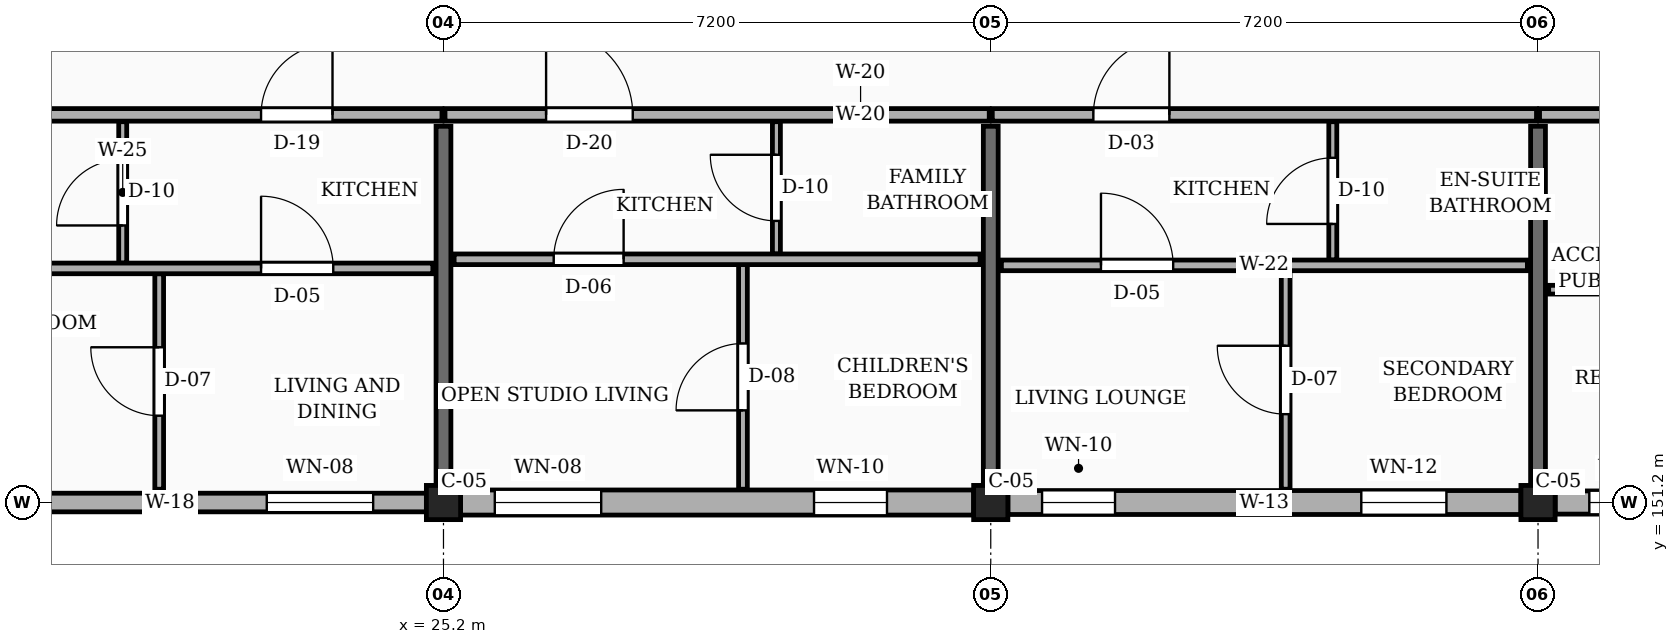
"""IFC4 building model, lengths in metres.
Left out: names, types, materials, properties, quantities, classifications, styles, units other than length and angle.
Written with IfcOpenShell. Run it as: python <this file> out.ifc"""

import sys

from ifc_helpers import new_model, si_unit, direction, frame, frame_2d, origin, origin_2d, place, context, subcontext, project, spatial, rectangle, extrude, element, fill, save


model = new_model("IFC4")
c1 = context("Model", 3, precision=1e-05, world=origin(), true_north=direction((0.0, 1.0)))
c2 = subcontext(c1, "Body", "Model", "MODEL_VIEW")
j1 = project(units=[si_unit("LENGTHUNIT", "METRE"), si_unit("PLANEANGLEUNIT", "RADIAN")], contexts=[c1])
p1 = place(None, origin())
s1 = spatial("IfcSite", under=j1, at=p1, CompositionType="ELEMENT")
p2 = place(p1, origin())
s2 = spatial("IfcBuilding", under=s1, at=p2, CompositionType="ELEMENT")
p3 = place(p2, frame((0.0, 0.0, 42.3)))
s3 = spatial("IfcBuildingStorey", under=s2, at=p3, CompositionType="ELEMENT", Elevation=42.3)
for number, where, z_axis, x_axis in (
    (1, (25.2, 151.2, 0.0), (0.0, 0.0, 1.0), (1.0, 0.0, 0.0)),
    (2, (32.4, 151.2, 0.0), (0.0, 0.0, 1.0), (1.0, 0.0, 0.0)),
    (3, (39.6, 151.2, 0.0), (0.0, 0.0, 1.0), (1.0, 0.0, 0.0)),
):
    element("IfcColumn", number, at=place(p3, frame(where, z_axis=z_axis, x_axis=x_axis)), inside=s3, PredefinedType="COLUMN", context=c2, shape_type="SweptSolid", body=[
        extrude(rectangle(XDim=0.45, YDim=0.45, at=origin_2d()), origin(), (0.0, 0.0, 1.0), 3.15),
    ])
for number, where, z_axis, x_axis in (
    (4, (25.2, 151.425, 0.0), (0.0, 0.0, 1.0), (0.0, 1.0, 0.0)),
    (5, (32.4, 151.425, 0.0), (0.0, 0.0, 1.0), (0.0, 1.0, 0.0)),
    (6, (39.6, 151.425, 0.0), (0.0, 0.0, 1.0), (0.0, 1.0, 0.0)),
):
    element("IfcWall", number, at=place(p3, frame(where, z_axis=z_axis, x_axis=x_axis)), inside=s3, PredefinedType="SOLIDWALL", context=c2, shape_type="SweptSolid", body=[
        extrude(rectangle(XDim=4.725, YDim=0.195, at=frame_2d((2.362, 0.0))), origin(), (0.0, 0.0, 1.0), 2.22),
    ])
p4 = place(p3, frame((18.225, 151.2, 0.0), z_axis=(0.0, 0.0, 1.0), x_axis=(1.0, 0.0, 0.0)))
e7 = element("IfcWall", 7, at=p4, inside=s3, PredefinedType="SOLIDWALL", context=c2, shape_type="SweptSolid", body=[
    extrude(rectangle(XDim=6.75, YDim=0.245, at=frame_2d((3.375, 0.0))), origin(), (0.0, 0.0, 1.0), 2.46),
])
p5 = place(p4, frame((0.45, 0.0, 0.78)))
e8 = element("IfcOpeningElement", 8, at=p5, cuts=e7, PredefinedType="OPENING", context=c2, shape_type="SweptSolid", body=[
    extrude(rectangle(XDim=1.24, YDim=1.15, at=frame_2d((0.62, 0.575))), frame((0.0, 0.133, 0.0), z_axis=(0.0, -1.0, 0.0), x_axis=(1.0, 0.0, 0.0)), (0.0, 0.0, 1.0), 0.265),
])
p6 = place(p4, frame((4.65, 0.0, 0.78)))
e9 = element("IfcOpeningElement", 9, at=p6, cuts=e7, PredefinedType="OPENING", context=c2, shape_type="SweptSolid", body=[
    extrude(rectangle(XDim=1.4, YDim=1.15, at=frame_2d((0.7, 0.575))), frame((0.0, 0.133, 0.0), z_axis=(0.0, -1.0, 0.0), x_axis=(1.0, 0.0, 0.0)), (0.0, 0.0, 1.0), 0.265),
])
p7 = place(p3, frame((25.425, 151.2, 0.0), z_axis=(0.0, 0.0, 1.0), x_axis=(1.0, 0.0, 0.0)))
e10 = element("IfcWall", 10, at=p7, inside=s3, PredefinedType="SOLIDWALL", context=c2, shape_type="SweptSolid", body=[
    extrude(rectangle(XDim=6.75, YDim=0.33, at=frame_2d((3.375, 0.0))), origin(), (0.0, 0.0, 1.0), 2.46),
])
p8 = place(p7, frame((0.45, 0.0, 0.78)))
e11 = element("IfcOpeningElement", 11, at=p8, cuts=e10, PredefinedType="OPENING", context=c2, shape_type="SweptSolid", body=[
    extrude(rectangle(XDim=1.4, YDim=1.15, at=frame_2d((0.7, 0.575))), frame((0.0, 0.175, 0.0), z_axis=(0.0, -1.0, 0.0), x_axis=(1.0, 0.0, 0.0)), (0.0, 0.0, 1.0), 0.35),
])
p9 = place(p7, frame((4.65, 0.0, 0.78)))
e12 = element("IfcOpeningElement", 12, at=p9, cuts=e10, PredefinedType="OPENING", context=c2, shape_type="SweptSolid", body=[
    extrude(rectangle(XDim=0.96, YDim=1.26, at=frame_2d((0.48, 0.63))), frame((0.0, 0.175, 0.0), z_axis=(0.0, -1.0, 0.0), x_axis=(1.0, 0.0, 0.0)), (0.0, 0.0, 1.0), 0.35),
])
p10 = place(p3, frame((32.625, 151.2, 0.0), z_axis=(0.0, 0.0, 1.0), x_axis=(1.0, 0.0, 0.0)))
e13 = element("IfcWall", 13, at=p10, inside=s3, PredefinedType="SOLIDWALL", context=c2, shape_type="SweptSolid", body=[
    extrude(rectangle(XDim=6.75, YDim=0.315, at=frame_2d((3.375, 0.0))), origin(), (0.0, 0.0, 1.0), 2.46),
])
p11 = place(p10, frame((0.45, 0.0, 0.78)))
e14 = element("IfcOpeningElement", 14, at=p11, cuts=e13, PredefinedType="OPENING", context=c2, shape_type="SweptSolid", body=[
    extrude(rectangle(XDim=0.96, YDim=1.26, at=frame_2d((0.48, 0.63))), frame((0.0, 0.167, 0.0), z_axis=(0.0, -1.0, 0.0), x_axis=(1.0, 0.0, 0.0)), (0.0, 0.0, 1.0), 0.335),
])
p12 = place(p10, frame((4.65, 0.0, 0.78)))
e15 = element("IfcOpeningElement", 15, at=p12, cuts=e13, PredefinedType="OPENING", context=c2, shape_type="SweptSolid", body=[
    extrude(rectangle(XDim=1.12, YDim=1.26, at=frame_2d((0.56, 0.63))), frame((0.0, 0.167, 0.0), z_axis=(0.0, -1.0, 0.0), x_axis=(1.0, 0.0, 0.0)), (0.0, 0.0, 1.0), 0.335),
])
p13 = place(p3, frame((39.825, 151.2, 0.0), z_axis=(0.0, 0.0, 1.0), x_axis=(1.0, 0.0, 0.0)))
e16 = element("IfcWall", 16, at=p13, inside=s3, PredefinedType="SOLIDWALL", context=c2, shape_type="SweptSolid", body=[
    extrude(rectangle(XDim=6.75, YDim=0.305, at=frame_2d((3.375, 0.0))), origin(), (0.0, 0.0, 1.0), 2.46),
])
p14 = place(p13, frame((0.45, 0.0, 0.78)))
e17 = element("IfcOpeningElement", 17, at=p14, cuts=e16, PredefinedType="OPENING", context=c2, shape_type="SweptSolid", body=[
    extrude(rectangle(XDim=1.12, YDim=1.26, at=frame_2d((0.56, 0.63))), frame((0.0, 0.163, 0.0), z_axis=(0.0, -1.0, 0.0), x_axis=(1.0, 0.0, 0.0)), (0.0, 0.0, 1.0), 0.325),
])
p15 = place(p13, frame((4.65, 0.0, 0.78)))
e18 = element("IfcOpeningElement", 18, at=p15, cuts=e16, PredefinedType="OPENING", context=c2, shape_type="SweptSolid", body=[
    extrude(rectangle(XDim=1.28, YDim=1.26, at=frame_2d((0.64, 0.63))), frame((0.0, 0.163, 0.0), z_axis=(0.0, -1.0, 0.0), x_axis=(1.0, 0.0, 0.0)), (0.0, 0.0, 1.0), 0.325),
])
p16 = place(p3, frame((18.175, 156.3, 0.0), z_axis=(0.0, 0.0, 1.0), x_axis=(1.0, 0.0, 0.0)))
e19 = element("IfcWall", 19, at=p16, inside=s3, PredefinedType="PARTITIONING", context=c2, shape_type="SweptSolid", body=[
    extrude(rectangle(XDim=7.005, YDim=0.165, at=frame_2d((3.502, 0.0))), origin(), (0.0, 0.0, 1.0), 2.325),
])
p17 = place(p16, frame((4.625, 0.0, 0.0)))
e20 = element("IfcOpeningElement", 20, at=p17, cuts=e19, PredefinedType="OPENING", context=c2, shape_type="SweptSolid", body=[
    extrude(rectangle(XDim=0.94, YDim=2.12, at=frame_2d((0.47, 1.06))), frame((0.0, 0.093, 0.0), z_axis=(0.0, -1.0, 0.0), x_axis=(1.0, 0.0, 0.0)), (0.0, 0.0, 1.0), 0.185),
])
p18 = place(p3, frame((25.22, 156.3, 0.0), z_axis=(0.0, 0.0, 1.0), x_axis=(1.0, 0.0, 0.0)))
e21 = element("IfcWall", 21, at=p18, inside=s3, PredefinedType="PARTITIONING", context=c2, shape_type="SweptSolid", body=[
    extrude(rectangle(XDim=7.16, YDim=0.165, at=frame_2d((3.58, 0.0))), origin(), (0.0, 0.0, 1.0), 2.325),
])
p19 = place(p18, frame((1.33, 0.0, 0.0)))
e22 = element("IfcOpeningElement", 22, at=p19, cuts=e21, PredefinedType="OPENING", context=c2, shape_type="SweptSolid", body=[
    extrude(rectangle(XDim=1.14, YDim=2.18, at=frame_2d((0.57, 1.09))), frame((0.0, 0.093, 0.0), z_axis=(0.0, -1.0, 0.0), x_axis=(1.0, 0.0, 0.0)), (0.0, 0.0, 1.0), 0.185),
])
p20 = place(p3, frame((32.42, 156.3, 0.0), z_axis=(0.0, 0.0, 1.0), x_axis=(1.0, 0.0, 0.0)))
e23 = element("IfcWall", 23, at=p20, inside=s3, PredefinedType="PARTITIONING", context=c2, shape_type="SweptSolid", body=[
    extrude(rectangle(XDim=7.16, YDim=0.165, at=frame_2d((3.58, 0.0))), origin(), (0.0, 0.0, 1.0), 2.325),
])
p21 = place(p20, frame((1.33, 0.0, 0.0)))
e24 = element("IfcOpeningElement", 24, at=p21, cuts=e23, PredefinedType="OPENING", context=c2, shape_type="SweptSolid", body=[
    extrude(rectangle(XDim=1.0, YDim=2.15, at=frame_2d((0.5, 1.075))), frame((0.0, 0.093, 0.0), z_axis=(0.0, -1.0, 0.0), x_axis=(1.0, 0.0, 0.0)), (0.0, 0.0, 1.0), 0.185),
])
p22 = place(p3, frame((39.62, 156.3, 0.0), z_axis=(0.0, 0.0, 1.0), x_axis=(1.0, 0.0, 0.0)))
e25 = element("IfcWall", 25, at=p22, inside=s3, PredefinedType="PARTITIONING", context=c2, shape_type="SweptSolid", body=[
    extrude(rectangle(XDim=7.005, YDim=0.165, at=frame_2d((3.502, 0.0))), origin(), (0.0, 0.0, 1.0), 2.325),
])
p23 = place(p22, frame((4.33, 0.0, 0.0)))
e26 = element("IfcOpeningElement", 26, at=p23, cuts=e25, PredefinedType="OPENING", context=c2, shape_type="SweptSolid", body=[
    extrude(rectangle(XDim=1.1, YDim=2.15, at=frame_2d((0.55, 1.075))), frame((0.0, 0.093, 0.0), z_axis=(0.0, -1.0, 0.0), x_axis=(1.0, 0.0, 0.0)), (0.0, 0.0, 1.0), 0.185),
])
p24 = place(p3, frame((21.46, 151.375, 0.0), z_axis=(0.0, 0.0, 1.0), x_axis=(0.0, 1.0, 0.0)))
e27 = element("IfcWall", 27, at=p24, inside=s3, PredefinedType="PARTITIONING", context=c2, shape_type="SweptSolid", body=[
    extrude(rectangle(XDim=2.835, YDim=0.115, at=frame_2d((1.417, 0.0))), origin(), (0.0, 0.0, 1.0), 2.325),
])
p25 = place(p24, frame((0.968, 0.0, 0.0)))
e28 = element("IfcOpeningElement", 28, at=p25, cuts=e27, PredefinedType="OPENING", context=c2, shape_type="SweptSolid", body=[
    extrude(rectangle(XDim=0.9, YDim=2.1, at=frame_2d((0.45, 1.05))), frame((0.0, 0.067, 0.0), z_axis=(0.0, -1.0, 0.0), x_axis=(1.0, 0.0, 0.0)), (0.0, 0.0, 1.0), 0.135),
])
p26 = place(p3, frame((20.98, 154.35, 0.0), z_axis=(0.0, 0.0, 1.0), x_axis=(0.0, 1.0, 0.0)))
e29 = element("IfcWall", 29, at=p26, inside=s3, PredefinedType="PARTITIONING", context=c2, shape_type="SweptSolid", body=[
    extrude(rectangle(XDim=1.86, YDim=0.105, at=frame_2d((0.93, 0.0))), origin(), (0.0, 0.0, 1.0), 2.325),
])
p27 = place(p26, frame((0.495, 0.0, 0.0)))
e30 = element("IfcOpeningElement", 30, at=p27, cuts=e29, PredefinedType="OPENING", context=c2, shape_type="SweptSolid", body=[
    extrude(rectangle(XDim=0.87, YDim=2.05, at=frame_2d((0.435, 1.025))), frame((0.0, 0.062, 0.0), z_axis=(0.0, -1.0, 0.0), x_axis=(1.0, 0.0, 0.0)), (0.0, 0.0, 1.0), 0.125),
])
p28 = place(p3, frame((18.175, 154.28, 0.0), z_axis=(0.0, 0.0, 1.0), x_axis=(1.0, 0.0, 0.0)))
e31 = element("IfcWall", 31, at=p28, inside=s3, PredefinedType="PARTITIONING", context=c2, shape_type="SweptSolid", body=[
    extrude(rectangle(XDim=6.885, YDim=0.14, at=frame_2d((3.442, 0.0))), origin(), (0.0, 0.0, 1.0), 2.325),
])
p29 = place(p28, frame((4.625, 0.0, 0.0)))
e32 = element("IfcOpeningElement", 32, at=p29, cuts=e31, PredefinedType="OPENING", context=c2, shape_type="SweptSolid", body=[
    extrude(rectangle(XDim=0.95, YDim=2.1, at=frame_2d((0.475, 1.05))), frame((0.0, 0.08, 0.0), z_axis=(0.0, -1.0, 0.0), x_axis=(1.0, 0.0, 0.0)), (0.0, 0.0, 1.0), 0.16),
])
p30 = place(p3, frame((29.14, 151.375, 0.0), z_axis=(0.0, 0.0, 1.0), x_axis=(0.0, 1.0, 0.0)))
e33 = element("IfcWall", 33, at=p30, inside=s3, PredefinedType="PARTITIONING", context=c2, shape_type="SweptSolid", body=[
    extrude(rectangle(XDim=2.955, YDim=0.115, at=frame_2d((1.478, 0.0))), origin(), (0.0, 0.0, 1.0), 2.325),
])
p31 = place(p30, frame((1.038, 0.0, 0.0)))
e34 = element("IfcOpeningElement", 34, at=p31, cuts=e33, PredefinedType="OPENING", context=c2, shape_type="SweptSolid", body=[
    extrude(rectangle(XDim=0.88, YDim=2.08, at=frame_2d((0.44, 1.04))), frame((0.0, 0.067, 0.0), z_axis=(0.0, -1.0, 0.0), x_axis=(1.0, 0.0, 0.0)), (0.0, 0.0, 1.0), 0.135),
])
p32 = place(p3, frame((29.58, 154.47, 0.0), z_axis=(0.0, 0.0, 1.0), x_axis=(0.0, 1.0, 0.0)))
e35 = element("IfcWall", 35, at=p32, inside=s3, PredefinedType="PARTITIONING", context=c2, shape_type="SweptSolid", body=[
    extrude(rectangle(XDim=1.74, YDim=0.105, at=frame_2d((0.87, 0.0))), origin(), (0.0, 0.0, 1.0), 2.325),
])
p33 = place(p32, frame((0.435, 0.0, 0.0)))
e36 = element("IfcOpeningElement", 36, at=p33, cuts=e35, PredefinedType="OPENING", context=c2, shape_type="SweptSolid", body=[
    extrude(rectangle(XDim=0.87, YDim=2.05, at=frame_2d((0.435, 1.025))), frame((0.0, 0.062, 0.0), z_axis=(0.0, -1.0, 0.0), x_axis=(1.0, 0.0, 0.0)), (0.0, 0.0, 1.0), 0.125),
])
p34 = place(p3, frame((25.34, 154.4, 0.0), z_axis=(0.0, 0.0, 1.0), x_axis=(1.0, 0.0, 0.0)))
e37 = element("IfcWall", 37, at=p34, inside=s3, PredefinedType="PARTITIONING", context=c2, shape_type="SweptSolid", body=[
    extrude(rectangle(XDim=6.92, YDim=0.14, at=frame_2d((3.46, 0.0))), origin(), (0.0, 0.0, 1.0), 2.325),
])
p35 = place(p34, frame((1.31, 0.0, 0.0)))
e38 = element("IfcOpeningElement", 38, at=p35, cuts=e37, PredefinedType="OPENING", context=c2, shape_type="SweptSolid", body=[
    extrude(rectangle(XDim=0.92, YDim=2.1, at=frame_2d((0.46, 1.05))), frame((0.0, 0.08, 0.0), z_axis=(0.0, -1.0, 0.0), x_axis=(1.0, 0.0, 0.0)), (0.0, 0.0, 1.0), 0.16),
])
p36 = place(p3, frame((36.28, 151.375, 0.0), z_axis=(0.0, 0.0, 1.0), x_axis=(0.0, 1.0, 0.0)))
e39 = element("IfcWall", 39, at=p36, inside=s3, PredefinedType="PARTITIONING", context=c2, shape_type="SweptSolid", body=[
    extrude(rectangle(XDim=2.875, YDim=0.115, at=frame_2d((1.438, 0.0))), origin(), (0.0, 0.0, 1.0), 2.325),
])
p37 = place(p36, frame((0.988, 0.0, 0.0)))
e40 = element("IfcOpeningElement", 40, at=p37, cuts=e39, PredefinedType="OPENING", context=c2, shape_type="SweptSolid", body=[
    extrude(rectangle(XDim=0.9, YDim=2.1, at=frame_2d((0.45, 1.05))), frame((0.0, 0.067, 0.0), z_axis=(0.0, -1.0, 0.0), x_axis=(1.0, 0.0, 0.0)), (0.0, 0.0, 1.0), 0.135),
])
p38 = place(p3, frame((36.9, 154.39, 0.0), z_axis=(0.0, 0.0, 1.0), x_axis=(0.0, 1.0, 0.0)))
e41 = element("IfcWall", 41, at=p38, inside=s3, PredefinedType="PARTITIONING", context=c2, shape_type="SweptSolid", body=[
    extrude(rectangle(XDim=1.82, YDim=0.105, at=frame_2d((0.91, 0.0))), origin(), (0.0, 0.0, 1.0), 2.325),
])
p39 = place(p38, frame((0.475, 0.0, 0.0)))
e42 = element("IfcOpeningElement", 42, at=p39, cuts=e41, PredefinedType="OPENING", context=c2, shape_type="SweptSolid", body=[
    extrude(rectangle(XDim=0.87, YDim=2.05, at=frame_2d((0.435, 1.025))), frame((0.0, 0.062, 0.0), z_axis=(0.0, -1.0, 0.0), x_axis=(1.0, 0.0, 0.0)), (0.0, 0.0, 1.0), 0.125),
])
p40 = place(p3, frame((32.54, 154.32, 0.0), z_axis=(0.0, 0.0, 1.0), x_axis=(1.0, 0.0, 0.0)))
e43 = element("IfcWall", 43, at=p40, inside=s3, PredefinedType="PARTITIONING", context=c2, shape_type="SweptSolid", body=[
    extrude(rectangle(XDim=6.92, YDim=0.14, at=frame_2d((3.46, 0.0))), origin(), (0.0, 0.0, 1.0), 2.325),
])
p41 = place(p40, frame((1.31, 0.0, 0.0)))
e44 = element("IfcOpeningElement", 44, at=p41, cuts=e43, PredefinedType="OPENING", context=c2, shape_type="SweptSolid", body=[
    extrude(rectangle(XDim=0.95, YDim=2.1, at=frame_2d((0.475, 1.05))), frame((0.0, 0.08, 0.0), z_axis=(0.0, -1.0, 0.0), x_axis=(1.0, 0.0, 0.0)), (0.0, 0.0, 1.0), 0.16),
])
p42 = place(p3, frame((39.74, 154.0, 0.0), z_axis=(0.0, 0.0, 1.0), x_axis=(1.0, 0.0, 0.0)))
e45 = element("IfcWall", 45, at=p42, inside=s3, PredefinedType="PARTITIONING", context=c2, shape_type="SweptSolid", body=[
    extrude(rectangle(XDim=2.41, YDim=0.115, at=frame_2d((1.205, 0.0))), origin(), (0.0, 0.0, 1.0), 2.325),
])
p43 = place(p6, origin())
e46 = element("IfcWindow", 46, at=p43, inside=s3, PartitioningType="SINGLE_PANEL", PredefinedType="WINDOW", context=c2, shape_type="SweptSolid", body=[
    extrude(rectangle(XDim=1.4, YDim=1.15, at=frame_2d((0.7, 0.575))), frame((0.0, 0.03, 0.0), z_axis=(0.0, -1.0, 0.0), x_axis=(1.0, 0.0, 0.0)), (0.0, 0.0, 1.0), 0.06),
])
fill(e9, e46)
p44 = place(p8, origin())
e47 = element("IfcWindow", 47, at=p44, inside=s3, PartitioningType="SINGLE_PANEL", PredefinedType="WINDOW", context=c2, shape_type="SweptSolid", body=[
    extrude(rectangle(XDim=1.4, YDim=1.15, at=frame_2d((0.7, 0.575))), frame((0.0, 0.03, 0.0), z_axis=(0.0, -1.0, 0.0), x_axis=(1.0, 0.0, 0.0)), (0.0, 0.0, 1.0), 0.06),
])
fill(e11, e47)
p45 = place(p9, origin())
e48 = element("IfcWindow", 48, at=p45, inside=s3, PartitioningType="SINGLE_PANEL", PredefinedType="WINDOW", context=c2, shape_type="SweptSolid", body=[
    extrude(rectangle(XDim=0.96, YDim=1.26, at=frame_2d((0.48, 0.63))), frame((0.0, 0.03, 0.0), z_axis=(0.0, -1.0, 0.0), x_axis=(1.0, 0.0, 0.0)), (0.0, 0.0, 1.0), 0.06),
])
fill(e12, e48)
p46 = place(p11, origin())
e49 = element("IfcWindow", 49, at=p46, inside=s3, PartitioningType="SINGLE_PANEL", PredefinedType="WINDOW", context=c2, shape_type="SweptSolid", body=[
    extrude(rectangle(XDim=0.96, YDim=1.26, at=frame_2d((0.48, 0.63))), frame((0.0, 0.03, 0.0), z_axis=(0.0, -1.0, 0.0), x_axis=(1.0, 0.0, 0.0)), (0.0, 0.0, 1.0), 0.06),
])
fill(e14, e49)
p47 = place(p12, origin())
e50 = element("IfcWindow", 50, at=p47, inside=s3, PartitioningType="SINGLE_PANEL", PredefinedType="WINDOW", context=c2, shape_type="SweptSolid", body=[
    extrude(rectangle(XDim=1.12, YDim=1.26, at=frame_2d((0.56, 0.63))), frame((0.0, 0.03, 0.0), z_axis=(0.0, -1.0, 0.0), x_axis=(1.0, 0.0, 0.0)), (0.0, 0.0, 1.0), 0.06),
])
fill(e15, e50)
p48 = place(p14, origin())
e51 = element("IfcWindow", 51, at=p48, inside=s3, PartitioningType="SINGLE_PANEL", PredefinedType="WINDOW", context=c2, shape_type="SweptSolid", body=[
    extrude(rectangle(XDim=1.12, YDim=1.26, at=frame_2d((0.56, 0.63))), frame((0.0, 0.03, 0.0), z_axis=(0.0, -1.0, 0.0), x_axis=(1.0, 0.0, 0.0)), (0.0, 0.0, 1.0), 0.06),
])
fill(e17, e51)
p49 = place(p17, origin())
e52 = element("IfcDoor", 52, at=p49, inside=s3, OperationType="SINGLE_SWING_RIGHT", PredefinedType="DOOR", context=c2, shape_type="SweptSolid", body=[
    extrude(rectangle(XDim=0.94, YDim=2.12, at=frame_2d((0.47, 1.06))), frame((0.0, 0.025, 0.0), z_axis=(0.0, -1.0, 0.0), x_axis=(1.0, 0.0, 0.0)), (0.0, 0.0, 1.0), 0.05),
])
fill(e20, e52)
p50 = place(p19, origin())
e53 = element("IfcDoor", 53, at=p50, inside=s3, OperationType="SINGLE_SWING_LEFT", PredefinedType="DOOR", context=c2, shape_type="SweptSolid", body=[
    extrude(rectangle(XDim=1.14, YDim=2.18, at=frame_2d((0.57, 1.09))), frame((0.0, 0.025, 0.0), z_axis=(0.0, -1.0, 0.0), x_axis=(1.0, 0.0, 0.0)), (0.0, 0.0, 1.0), 0.05),
])
fill(e22, e53)
p51 = place(p21, origin())
e54 = element("IfcDoor", 54, at=p51, inside=s3, OperationType="SINGLE_SWING_RIGHT", PredefinedType="DOOR", context=c2, shape_type="SweptSolid", body=[
    extrude(rectangle(XDim=1.0, YDim=2.15, at=frame_2d((0.5, 1.075))), frame((0.0, 0.025, 0.0), z_axis=(0.0, -1.0, 0.0), x_axis=(1.0, 0.0, 0.0)), (0.0, 0.0, 1.0), 0.05),
])
fill(e24, e54)
p52 = place(p25, origin())
e55 = element("IfcDoor", 55, at=p52, inside=s3, OperationType="SINGLE_SWING_RIGHT", PredefinedType="DOOR", context=c2, shape_type="SweptSolid", body=[
    extrude(rectangle(XDim=0.9, YDim=2.1, at=frame_2d((0.45, 1.05))), frame((0.0, 0.025, 0.0), z_axis=(0.0, -1.0, 0.0), x_axis=(1.0, 0.0, 0.0)), (0.0, 0.0, 1.0), 0.05),
])
fill(e28, e55)
p53 = place(p27, origin())
e56 = element("IfcDoor", 56, at=p53, inside=s3, OperationType="SINGLE_SWING_LEFT", PredefinedType="DOOR", context=c2, shape_type="SweptSolid", body=[
    extrude(rectangle(XDim=0.87, YDim=2.05, at=frame_2d((0.435, 1.025))), frame((0.0, 0.025, 0.0), z_axis=(0.0, -1.0, 0.0), x_axis=(1.0, 0.0, 0.0)), (0.0, 0.0, 1.0), 0.05),
])
fill(e30, e56)
p54 = place(p29, origin())
e57 = element("IfcDoor", 57, at=p54, inside=s3, OperationType="SINGLE_SWING_LEFT", PredefinedType="DOOR", context=c2, shape_type="SweptSolid", body=[
    extrude(rectangle(XDim=0.95, YDim=2.1, at=frame_2d((0.475, 1.05))), frame((0.0, 0.025, 0.0), z_axis=(0.0, -1.0, 0.0), x_axis=(1.0, 0.0, 0.0)), (0.0, 0.0, 1.0), 0.05),
])
fill(e32, e57)
p55 = place(p31, origin())
e58 = element("IfcDoor", 58, at=p55, inside=s3, OperationType="SINGLE_SWING_LEFT", PredefinedType="DOOR", context=c2, shape_type="SweptSolid", body=[
    extrude(rectangle(XDim=0.88, YDim=2.08, at=frame_2d((0.44, 1.04))), frame((0.0, 0.025, 0.0), z_axis=(0.0, -1.0, 0.0), x_axis=(1.0, 0.0, 0.0)), (0.0, 0.0, 1.0), 0.05),
])
fill(e34, e58)
p56 = place(p33, origin())
e59 = element("IfcDoor", 59, at=p56, inside=s3, OperationType="SINGLE_SWING_RIGHT", PredefinedType="DOOR", context=c2, shape_type="SweptSolid", body=[
    extrude(rectangle(XDim=0.87, YDim=2.05, at=frame_2d((0.435, 1.025))), frame((0.0, 0.025, 0.0), z_axis=(0.0, -1.0, 0.0), x_axis=(1.0, 0.0, 0.0)), (0.0, 0.0, 1.0), 0.05),
])
fill(e36, e59)
p57 = place(p35, origin())
e60 = element("IfcDoor", 60, at=p57, inside=s3, OperationType="SINGLE_SWING_RIGHT", PredefinedType="DOOR", context=c2, shape_type="SweptSolid", body=[
    extrude(rectangle(XDim=0.92, YDim=2.1, at=frame_2d((0.46, 1.05))), frame((0.0, 0.025, 0.0), z_axis=(0.0, -1.0, 0.0), x_axis=(1.0, 0.0, 0.0)), (0.0, 0.0, 1.0), 0.05),
])
fill(e38, e60)
p58 = place(p37, origin())
e61 = element("IfcDoor", 61, at=p58, inside=s3, OperationType="SINGLE_SWING_RIGHT", PredefinedType="DOOR", context=c2, shape_type="SweptSolid", body=[
    extrude(rectangle(XDim=0.9, YDim=2.1, at=frame_2d((0.45, 1.05))), frame((0.0, 0.025, 0.0), z_axis=(0.0, -1.0, 0.0), x_axis=(1.0, 0.0, 0.0)), (0.0, 0.0, 1.0), 0.05),
])
fill(e40, e61)
p59 = place(p39, origin())
e62 = element("IfcDoor", 62, at=p59, inside=s3, OperationType="SINGLE_SWING_LEFT", PredefinedType="DOOR", context=c2, shape_type="SweptSolid", body=[
    extrude(rectangle(XDim=0.87, YDim=2.05, at=frame_2d((0.435, 1.025))), frame((0.0, 0.025, 0.0), z_axis=(0.0, -1.0, 0.0), x_axis=(1.0, 0.0, 0.0)), (0.0, 0.0, 1.0), 0.05),
])
fill(e42, e62)
p60 = place(p41, origin())
e63 = element("IfcDoor", 63, at=p60, inside=s3, OperationType="SINGLE_SWING_LEFT", PredefinedType="DOOR", context=c2, shape_type="SweptSolid", body=[
    extrude(rectangle(XDim=0.95, YDim=2.1, at=frame_2d((0.475, 1.05))), frame((0.0, 0.025, 0.0), z_axis=(0.0, -1.0, 0.0), x_axis=(1.0, 0.0, 0.0)), (0.0, 0.0, 1.0), 0.05),
])
fill(e44, e63)
save(model, sys.argv[1])
